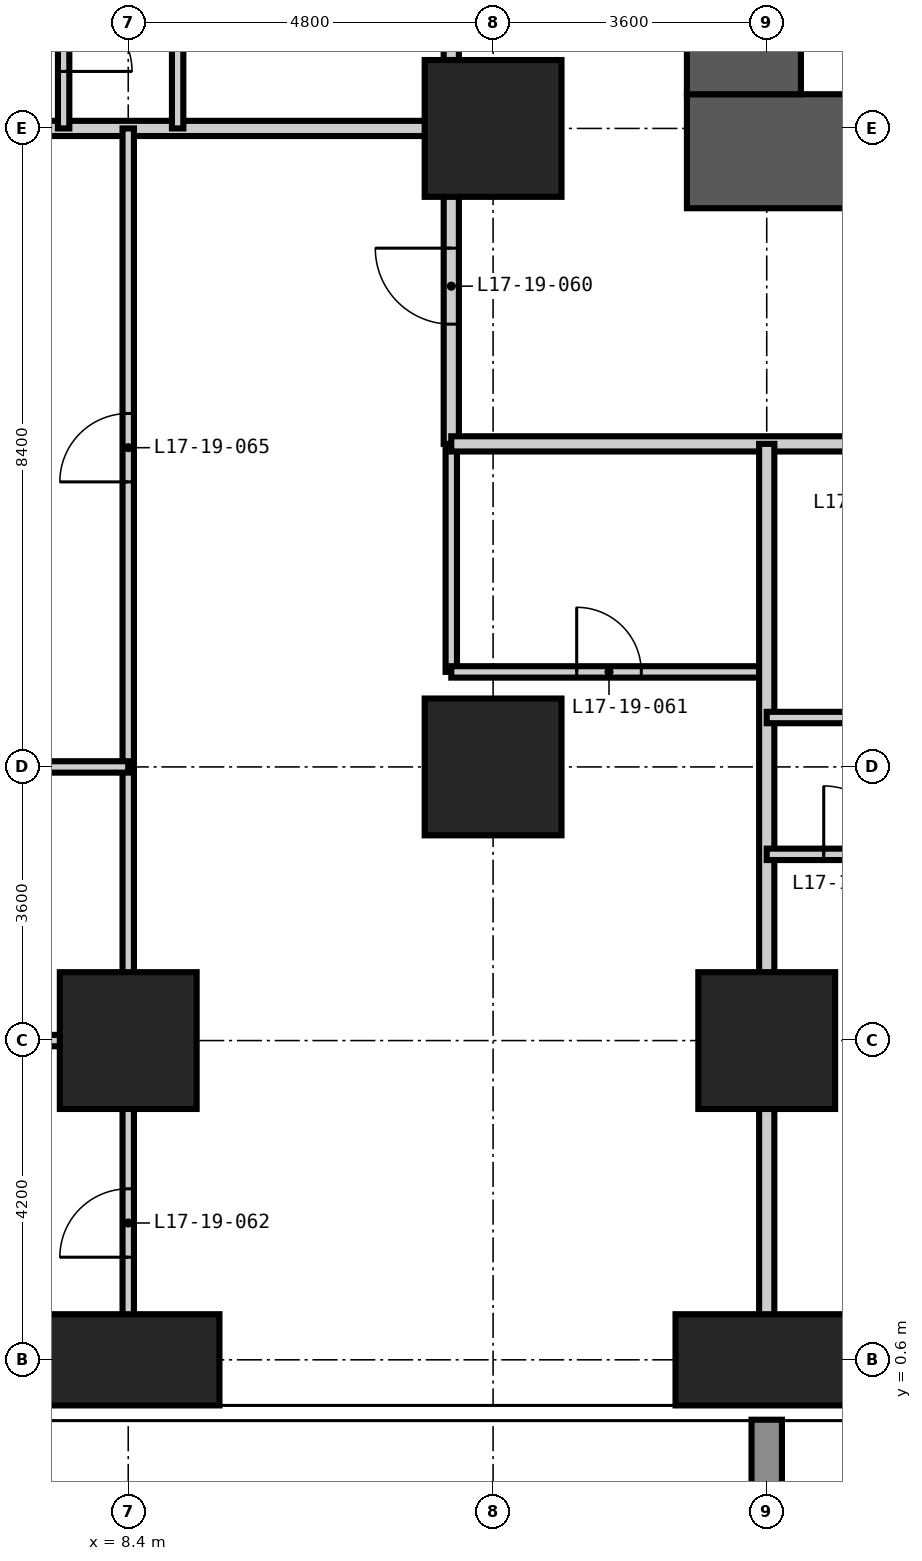
"""IFC4 building model, lengths in metres.
Left out: names, types, materials, properties, quantities, classifications, styles, units other than length and angle.
Written with IfcOpenShell. Run it as: python <this file> out.ifc"""

import sys

from ifc_helpers import new_model, si_unit, direction, frame, frame_2d, origin, origin_2d, place, context, subcontext, project, spatial, rectangle, extrude, element, fill, save


model = new_model("IFC4")
c1 = context("Model", 3, precision=1e-05, world=origin(), true_north=direction((0.0, 1.0)))
c2 = subcontext(c1, "Body", "Model", "MODEL_VIEW")
j1 = project(units=[si_unit("LENGTHUNIT", "METRE"), si_unit("PLANEANGLEUNIT", "RADIAN")], contexts=[c1])
p1 = place(None, origin())
s1 = spatial("IfcSite", under=j1, at=p1, CompositionType="ELEMENT")
p2 = place(p1, origin())
s2 = spatial("IfcBuilding", under=s1, at=p2, CompositionType="ELEMENT")
p3 = place(p2, frame((0.0, 0.0, 70.2)))
s3 = spatial("IfcBuildingStorey", under=s2, at=p3, CompositionType="ELEMENT", Elevation=70.2)
p4 = place(p3, frame((8.4, 0.6, -0.35), z_axis=(0.0, 0.0, 1.0), x_axis=(1.0, 0.0, 0.0)))
e1 = element("IfcColumn", 1, at=p4, inside=s3, PredefinedType="COLUMN", context=c2, shape_type="SweptSolid", body=[
    extrude(rectangle(XDim=2.4, YDim=1.2, at=origin_2d()), origin(), (0.0, 0.0, 1.0), 3.6),
])
for number, where, z_axis, x_axis in (
    (2, (8.4, 4.8, -0.35), (0.0, 0.0, 1.0), (1.0, 0.0, 0.0)),
    (3, (13.2, 8.4, -0.35), (0.0, 0.0, 1.0), (1.0, 0.0, 0.0)),
    (4, (13.2, 16.8, -0.35), (0.0, 0.0, 1.0), (1.0, 0.0, 0.0)),
):
    element("IfcColumn", number, at=place(p3, frame(where, z_axis=z_axis, x_axis=x_axis)), inside=s3, PredefinedType="COLUMN", context=c2, shape_type="SweptSolid", body=[
        extrude(rectangle(XDim=1.8, YDim=1.8, at=origin_2d()), origin(), (0.0, 0.0, 1.0), 3.6),
    ])
p5 = place(p3, frame((16.8, 0.6, -0.35), z_axis=(0.0, 0.0, 1.0), x_axis=(1.0, 0.0, 0.0)))
e5 = element("IfcColumn", 5, at=p5, inside=s3, PredefinedType="COLUMN", context=c2, shape_type="SweptSolid", body=[
    extrude(rectangle(XDim=2.4, YDim=1.2, at=origin_2d()), origin(), (0.0, 0.0, 1.0), 3.6),
])
p6 = place(p3, frame((16.8, 4.8, -0.35), z_axis=(0.0, 0.0, 1.0), x_axis=(1.0, 0.0, 0.0)))
e6 = element("IfcColumn", 6, at=p6, inside=s3, PredefinedType="COLUMN", context=c2, shape_type="SweptSolid", body=[
    extrude(rectangle(XDim=1.8, YDim=1.8, at=origin_2d()), origin(), (0.0, 0.0, 1.0), 3.6),
])
p7 = place(p3, frame((15.75, 16.5, -0.35), z_axis=(0.0, 0.0, 1.0), x_axis=(1.0, 0.0, 0.0)))
e7 = element("IfcWall", 7, at=p7, inside=s3, PredefinedType="SHEAR", context=c2, shape_type="SweptSolid", body=[
    extrude(rectangle(XDim=27.3, YDim=1.5, at=frame_2d((13.65, 0.0))), origin(), (0.0, 0.0, 1.0), 3.6),
])
p8 = place(p7, frame((13.15, 0.0, 0.35)))
e8 = element("IfcOpeningElement", 8, at=p8, cuts=e7, PredefinedType="OPENING", context=c2, shape_type="SweptSolid", body=[
    extrude(rectangle(XDim=1.0, YDim=2.1, at=frame_2d((0.5, 1.05))), frame((0.0, 0.76, 0.0), z_axis=(0.0, -1.0, 0.0), x_axis=(1.0, 0.0, 0.0)), (0.0, 0.0, 1.0), 1.52),
])
p9 = place(p7, frame((19.45, 0.0, 0.35)))
e9 = element("IfcOpeningElement", 9, at=p9, cuts=e7, PredefinedType="OPENING", context=c2, shape_type="SweptSolid", body=[
    extrude(rectangle(XDim=1.0, YDim=2.1, at=frame_2d((0.5, 1.05))), frame((0.0, 0.76, 0.0), z_axis=(0.0, -1.0, 0.0), x_axis=(1.0, 0.0, 0.0)), (0.0, 0.0, 1.0), 1.52),
])
p10 = place(p3, frame((16.5, 41.55, -0.35), z_axis=(0.0, 0.0, 1.0), x_axis=(0.0, -1.0, 0.0)))
e10 = element("IfcWall", 10, at=p10, inside=s3, PredefinedType="SHEAR", context=c2, shape_type="SweptSolid", body=[
    extrude(rectangle(XDim=24.3, YDim=1.5, at=frame_2d((12.15, 0.0))), origin(), (0.0, 0.0, 1.0), 3.6),
])
p11 = place(p10, frame((11.25, 0.0, 0.35)))
e11 = element("IfcOpeningElement", 11, at=p11, cuts=e10, PredefinedType="OPENING", context=c2, shape_type="SweptSolid", body=[
    extrude(rectangle(XDim=1.8, YDim=2.2, at=frame_2d((0.9, 1.1))), frame((0.0, 0.76, 0.0), z_axis=(0.0, -1.0, 0.0), x_axis=(1.0, 0.0, 0.0)), (0.0, 0.0, 1.0), 1.52),
])
p12 = place(p10, frame((20.05, 0.0, 0.35)))
e12 = element("IfcOpeningElement", 12, at=p12, cuts=e10, PredefinedType="OPENING", context=c2, shape_type="SweptSolid", body=[
    extrude(rectangle(XDim=1.0, YDim=2.1, at=frame_2d((0.5, 1.05))), frame((0.0, 0.76, 0.0), z_axis=(0.0, -1.0, 0.0), x_axis=(1.0, 0.0, 0.0)), (0.0, 0.0, 1.0), 1.52),
])
p13 = place(p10, frame((5.35, 0.0, 0.35)))
e13 = element("IfcOpeningElement", 13, at=p13, cuts=e10, PredefinedType="OPENING", context=c2, shape_type="SweptSolid", body=[
    extrude(rectangle(XDim=1.0, YDim=2.1, at=frame_2d((0.5, 1.05))), frame((0.0, 0.76, 0.0), z_axis=(0.0, -1.0, 0.0), x_axis=(1.0, 0.0, 0.0)), (0.0, 0.0, 1.0), 1.52),
])
for number, where, z_axis, x_axis in (
    (14, (12.65, 9.65, 0.0), (0.0, 0.0, 1.0), (0.0, 1.0, 0.0)),
    (15, (5.4, 4.8, 0.0), (0.0, 0.0, 1.0), (1.0, 0.0, 0.0)),
):
    element("IfcWall", number, at=place(p3, frame(where, z_axis=z_axis, x_axis=x_axis)), inside=s3, PredefinedType="PARTITIONING", context=c2, shape_type="SweptSolid", body=[
        extrude(rectangle(XDim=3.0, YDim=0.15, at=frame_2d((1.5, 0.0))), origin(), (0.0, 0.0, 1.0), 3.25),
    ])
p14 = place(p3, frame((12.65, 9.65, 0.0), z_axis=(0.0, 0.0, 1.0), x_axis=(1.0, 0.0, 0.0)))
e16 = element("IfcWall", 16, at=p14, inside=s3, PredefinedType="PARTITIONING", context=c2, shape_type="SweptSolid", body=[
    extrude(rectangle(XDim=4.15, YDim=0.15, at=frame_2d((2.075, 0.0))), origin(), (0.0, 0.0, 1.0), 3.25),
])
p15 = place(p14, frame((1.65, 0.0, 0.0)))
e17 = element("IfcOpeningElement", 17, at=p15, cuts=e16, PredefinedType="OPENING", context=c2, shape_type="SweptSolid", body=[
    extrude(rectangle(XDim=0.85, YDim=2.1, at=frame_2d((0.425, 1.05))), frame((0.0, 0.085, 0.0), z_axis=(0.0, -1.0, 0.0), x_axis=(1.0, 0.0, 0.0)), (0.0, 0.0, 1.0), 0.17),
])
p16 = place(p3, frame((12.65, 12.65, 0.0), z_axis=(0.0, 0.0, 1.0), x_axis=(0.0, 1.0, 0.0)))
e18 = element("IfcWall", 18, at=p16, inside=s3, PredefinedType="PARTITIONING", context=c2, shape_type="SweptSolid", body=[
    extrude(rectangle(XDim=32.9, YDim=0.2, at=frame_2d((16.45, 0.0))), origin(), (0.0, 0.0, 1.0), 3.25),
])
p17 = place(p16, frame((9.05, 0.0, 0.0)))
e19 = element("IfcOpeningElement", 19, at=p17, cuts=e18, PredefinedType="OPENING", context=c2, shape_type="SweptSolid", body=[
    extrude(rectangle(XDim=1.0, YDim=2.2, at=frame_2d((0.5, 1.1))), frame((0.0, 0.11, 0.0), z_axis=(0.0, -1.0, 0.0), x_axis=(1.0, 0.0, 0.0)), (0.0, 0.0, 1.0), 0.22),
])
p18 = place(p16, frame((15.05, 0.0, 0.0)))
e20 = element("IfcOpeningElement", 20, at=p18, cuts=e18, PredefinedType="OPENING", context=c2, shape_type="SweptSolid", body=[
    extrude(rectangle(XDim=1.0, YDim=2.2, at=frame_2d((0.5, 1.1))), frame((0.0, 0.11, 0.0), z_axis=(0.0, -1.0, 0.0), x_axis=(1.0, 0.0, 0.0)), (0.0, 0.0, 1.0), 0.22),
])
p19 = place(p16, frame((25.85, 0.0, 0.0)))
e21 = element("IfcOpeningElement", 21, at=p19, cuts=e18, PredefinedType="OPENING", context=c2, shape_type="SweptSolid", body=[
    extrude(rectangle(XDim=1.0, YDim=2.2, at=frame_2d((0.5, 1.1))), frame((0.0, 0.11, 0.0), z_axis=(0.0, -1.0, 0.0), x_axis=(1.0, 0.0, 0.0)), (0.0, 0.0, 1.0), 0.22),
])
p20 = place(p16, frame((1.575, 0.0, 0.0)))
e22 = element("IfcOpeningElement", 22, at=p20, cuts=e18, PredefinedType="OPENING", context=c2, shape_type="SweptSolid", body=[
    extrude(rectangle(XDim=1.0, YDim=2.2, at=frame_2d((0.5, 1.1))), frame((0.0, 0.11, 0.0), z_axis=(0.0, -1.0, 0.0), x_axis=(1.0, 0.0, 0.0)), (0.0, 0.0, 1.0), 0.22),
])
p21 = place(p16, frame((30.625, 0.0, 0.0)))
e23 = element("IfcOpeningElement", 23, at=p21, cuts=e18, PredefinedType="OPENING", context=c2, shape_type="SweptSolid", body=[
    extrude(rectangle(XDim=1.0, YDim=2.2, at=frame_2d((0.5, 1.1))), frame((0.0, 0.11, 0.0), z_axis=(0.0, -1.0, 0.0), x_axis=(1.0, 0.0, 0.0)), (0.0, 0.0, 1.0), 0.22),
])
p22 = place(p3, frame((44.95, 12.65, 0.0), z_axis=(0.0, 0.0, 1.0), x_axis=(-1.0, 0.0, 0.0)))
e24 = element("IfcWall", 24, at=p22, inside=s3, PredefinedType="PARTITIONING", context=c2, shape_type="SweptSolid", body=[
    extrude(rectangle(XDim=32.3, YDim=0.2, at=frame_2d((16.15, 0.0))), origin(), (0.0, 0.0, 1.0), 3.25),
])
p23 = place(p22, frame((24.35, 0.0, 0.0)))
e25 = element("IfcOpeningElement", 25, at=p23, cuts=e24, PredefinedType="OPENING", context=c2, shape_type="SweptSolid", body=[
    extrude(rectangle(XDim=1.0, YDim=2.2, at=frame_2d((0.5, 1.1))), frame((0.0, 0.11, 0.0), z_axis=(0.0, -1.0, 0.0), x_axis=(1.0, 0.0, 0.0)), (0.0, 0.0, 1.0), 0.22),
])
p24 = place(p22, frame((22.55, 0.0, 0.0)))
e26 = element("IfcOpeningElement", 26, at=p24, cuts=e24, PredefinedType="OPENING", context=c2, shape_type="SweptSolid", body=[
    extrude(rectangle(XDim=1.0, YDim=2.2, at=frame_2d((0.5, 1.1))), frame((0.0, 0.11, 0.0), z_axis=(0.0, -1.0, 0.0), x_axis=(1.0, 0.0, 0.0)), (0.0, 0.0, 1.0), 0.22),
])
p25 = place(p22, frame((15.95, 0.0, 0.0)))
e27 = element("IfcOpeningElement", 27, at=p25, cuts=e24, PredefinedType="OPENING", context=c2, shape_type="SweptSolid", body=[
    extrude(rectangle(XDim=1.0, YDim=2.2, at=frame_2d((0.5, 1.1))), frame((0.0, 0.11, 0.0), z_axis=(0.0, -1.0, 0.0), x_axis=(1.0, 0.0, 0.0)), (0.0, 0.0, 1.0), 0.22),
])
p26 = place(p22, frame((14.15, 0.0, 0.0)))
e28 = element("IfcOpeningElement", 28, at=p26, cuts=e24, PredefinedType="OPENING", context=c2, shape_type="SweptSolid", body=[
    extrude(rectangle(XDim=1.0, YDim=2.2, at=frame_2d((0.5, 1.1))), frame((0.0, 0.11, 0.0), z_axis=(0.0, -1.0, 0.0), x_axis=(1.0, 0.0, 0.0)), (0.0, 0.0, 1.0), 0.22),
])
p27 = place(p22, frame((7.55, 0.0, 0.0)))
e29 = element("IfcOpeningElement", 29, at=p27, cuts=e24, PredefinedType="OPENING", context=c2, shape_type="SweptSolid", body=[
    extrude(rectangle(XDim=1.0, YDim=2.2, at=frame_2d((0.5, 1.1))), frame((0.0, 0.11, 0.0), z_axis=(0.0, -1.0, 0.0), x_axis=(1.0, 0.0, 0.0)), (0.0, 0.0, 1.0), 0.22),
])
p28 = place(p22, frame((5.75, 0.0, 0.0)))
e30 = element("IfcOpeningElement", 30, at=p28, cuts=e24, PredefinedType="OPENING", context=c2, shape_type="SweptSolid", body=[
    extrude(rectangle(XDim=1.0, YDim=2.2, at=frame_2d((0.5, 1.1))), frame((0.0, 0.11, 0.0), z_axis=(0.0, -1.0, 0.0), x_axis=(1.0, 0.0, 0.0)), (0.0, 0.0, 1.0), 0.22),
])
for number, where, z_axis, x_axis in (
    (31, (16.8, -0.008, 0.0), (0.0, 0.0, 1.0), (0.0, 1.0, 0.0)),
    (32, (-0.008, 16.8, 0.0), (0.0, 0.0, 1.0), (1.0, 0.0, 0.0)),
):
    element("IfcWall", number, at=place(p3, frame(where, z_axis=z_axis, x_axis=x_axis)), inside=s3, PredefinedType="PARTITIONING", context=c2, shape_type="SweptSolid", body=[
        extrude(rectangle(XDim=12.658, YDim=0.2, at=frame_2d((6.329, 0.0))), origin(), (0.0, 0.0, 1.0), 3.25),
    ])
p29 = place(p3, frame((7.55, 16.8, 0.0), z_axis=(0.0, 0.0, 1.0), x_axis=(0.0, 1.0, 0.0)))
e33 = element("IfcWall", 33, at=p29, inside=s3, PredefinedType="PARTITIONING", context=c2, shape_type="SweptSolid", body=[
    extrude(rectangle(XDim=2.4, YDim=0.15, at=frame_2d((1.2, 0.0))), origin(), (0.0, 0.0, 1.0), 3.25),
])
p30 = place(p29, frame((0.75, 0.0, 0.0)))
e34 = element("IfcOpeningElement", 34, at=p30, cuts=e33, PredefinedType="OPENING", context=c2, shape_type="SweptSolid", body=[
    extrude(rectangle(XDim=0.9, YDim=2.1, at=frame_2d((0.45, 1.05))), frame((0.0, 0.085, 0.0), z_axis=(0.0, -1.0, 0.0), x_axis=(1.0, 0.0, 0.0)), (0.0, 0.0, 1.0), 0.17),
])
p31 = place(p3, frame((8.4, -0.008, 0.0), z_axis=(0.0, 0.0, 1.0), x_axis=(0.0, 1.0, 0.0)))
e35 = element("IfcWall", 35, at=p31, inside=s3, PredefinedType="PARTITIONING", context=c2, shape_type="SweptSolid", body=[
    extrude(rectangle(XDim=16.808, YDim=0.15, at=frame_2d((8.404, 0.0))), origin(), (0.0, 0.0, 1.0), 3.25),
])
p32 = place(p31, frame((1.958, 0.0, 0.0)))
e36 = element("IfcOpeningElement", 36, at=p32, cuts=e35, PredefinedType="OPENING", context=c2, shape_type="SweptSolid", body=[
    extrude(rectangle(XDim=0.9, YDim=2.1, at=frame_2d((0.45, 1.05))), frame((0.0, 0.085, 0.0), z_axis=(0.0, -1.0, 0.0), x_axis=(1.0, 0.0, 0.0)), (0.0, 0.0, 1.0), 0.17),
])
p33 = place(p31, frame((12.158, 0.0, 0.0)))
e37 = element("IfcOpeningElement", 37, at=p33, cuts=e35, PredefinedType="OPENING", context=c2, shape_type="SweptSolid", body=[
    extrude(rectangle(XDim=0.9, YDim=2.1, at=frame_2d((0.45, 1.05))), frame((0.0, 0.085, 0.0), z_axis=(0.0, -1.0, 0.0), x_axis=(1.0, 0.0, 0.0)), (0.0, 0.0, 1.0), 0.17),
])
p34 = place(p3, frame((9.05, 16.8, 0.0), z_axis=(0.0, 0.0, 1.0), x_axis=(0.0, 1.0, 0.0)))
e38 = element("IfcWall", 38, at=p34, inside=s3, PredefinedType="PARTITIONING", context=c2, shape_type="SweptSolid", body=[
    extrude(rectangle(XDim=2.4, YDim=0.15, at=frame_2d((1.2, 0.0))), origin(), (0.0, 0.0, 1.0), 3.25),
])
p35 = place(p3, frame((16.8, 7.25, 0.0), z_axis=(0.0, 0.0, 1.0), x_axis=(1.0, 0.0, 0.0)))
e39 = element("IfcWall", 39, at=p35, inside=s3, PredefinedType="PARTITIONING", context=c2, shape_type="SweptSolid", body=[
    extrude(rectangle(XDim=2.4, YDim=0.15, at=frame_2d((1.2, 0.0))), origin(), (0.0, 0.0, 1.0), 3.25),
])
p36 = place(p35, frame((0.75, 0.0, 0.0)))
e40 = element("IfcOpeningElement", 40, at=p36, cuts=e39, PredefinedType="OPENING", context=c2, shape_type="SweptSolid", body=[
    extrude(rectangle(XDim=0.9, YDim=2.1, at=frame_2d((0.45, 1.05))), frame((0.0, 0.085, 0.0), z_axis=(0.0, -1.0, 0.0), x_axis=(1.0, 0.0, 0.0)), (0.0, 0.0, 1.0), 0.17),
])
p37 = place(p3, frame((-0.008, 8.4, 0.0), z_axis=(0.0, 0.0, 1.0), x_axis=(1.0, 0.0, 0.0)))
e41 = element("IfcWall", 41, at=p37, inside=s3, PredefinedType="PARTITIONING", context=c2, shape_type="SweptSolid", body=[
    extrude(rectangle(XDim=8.408, YDim=0.15, at=frame_2d((4.204, 0.0))), origin(), (0.0, 0.0, 1.0), 3.25),
])
p38 = place(p37, frame((2.958, 0.0, 0.0)))
e42 = element("IfcOpeningElement", 42, at=p38, cuts=e41, PredefinedType="OPENING", context=c2, shape_type="SweptSolid", body=[
    extrude(rectangle(XDim=0.9, YDim=2.1, at=frame_2d((0.45, 1.05))), frame((0.0, 0.085, 0.0), z_axis=(0.0, -1.0, 0.0), x_axis=(1.0, 0.0, 0.0)), (0.0, 0.0, 1.0), 0.17),
])
p39 = place(p3, frame((16.8, 9.05, 0.0), z_axis=(0.0, 0.0, 1.0), x_axis=(1.0, 0.0, 0.0)))
e43 = element("IfcWall", 43, at=p39, inside=s3, PredefinedType="PARTITIONING", context=c2, shape_type="SweptSolid", body=[
    extrude(rectangle(XDim=2.4, YDim=0.15, at=frame_2d((1.2, 0.0))), origin(), (0.0, 0.0, 1.0), 3.25),
])
p40 = place(p36, origin())
e44 = element("IfcDoor", 44, at=p40, inside=s3, OperationType="SINGLE_SWING_LEFT", PredefinedType="DOOR", context=c2, shape_type="SweptSolid", body=[
    extrude(rectangle(XDim=0.9, YDim=2.1, at=frame_2d((0.45, 1.05))), frame((0.0, 0.025, 0.0), z_axis=(0.0, -1.0, 0.0), x_axis=(1.0, 0.0, 0.0)), (0.0, 0.0, 1.0), 0.05),
])
fill(e40, e44)
p41 = place(p30, frame((0.9, 0.0, 0.0), z_axis=(0.0, 0.0, 1.0), x_axis=(-1.0, 0.0, 0.0)))
e45 = element("IfcDoor", 45, at=p41, inside=s3, OperationType="SINGLE_SWING_RIGHT", PredefinedType="DOOR", context=c2, shape_type="SweptSolid", body=[
    extrude(rectangle(XDim=0.9, YDim=2.1, at=frame_2d((0.45, 1.05))), frame((0.0, 0.025, 0.0), z_axis=(0.0, -1.0, 0.0), x_axis=(1.0, 0.0, 0.0)), (0.0, 0.0, 1.0), 0.05),
])
fill(e34, e45)
p42 = place(p20, origin())
e46 = element("IfcDoor", 46, at=p42, inside=s3, OperationType="SINGLE_SWING_RIGHT", PredefinedType="DOOR", context=c2, shape_type="SweptSolid", body=[
    extrude(rectangle(XDim=1.0, YDim=2.2, at=frame_2d((0.5, 1.1))), frame((0.0, 0.025, 0.0), z_axis=(0.0, -1.0, 0.0), x_axis=(1.0, 0.0, 0.0)), (0.0, 0.0, 1.0), 0.05),
])
fill(e22, e46)
p43 = place(p15, origin())
e47 = element("IfcDoor", 47, at=p43, inside=s3, OperationType="SINGLE_SWING_LEFT", PredefinedType="DOOR", context=c2, shape_type="SweptSolid", body=[
    extrude(rectangle(XDim=0.85, YDim=2.1, at=frame_2d((0.425, 1.05))), frame((0.0, 0.025, 0.0), z_axis=(0.0, -1.0, 0.0), x_axis=(1.0, 0.0, 0.0)), (0.0, 0.0, 1.0), 0.05),
])
fill(e17, e47)
p44 = place(p32, origin())
e48 = element("IfcDoor", 48, at=p44, inside=s3, OperationType="SINGLE_SWING_LEFT", PredefinedType="DOOR", context=c2, shape_type="SweptSolid", body=[
    extrude(rectangle(XDim=0.9, YDim=2.1, at=frame_2d((0.45, 1.05))), frame((0.0, 0.025, 0.0), z_axis=(0.0, -1.0, 0.0), x_axis=(1.0, 0.0, 0.0)), (0.0, 0.0, 1.0), 0.05),
])
fill(e36, e48)
p45 = place(p33, origin())
e49 = element("IfcDoor", 49, at=p45, inside=s3, OperationType="SINGLE_SWING_LEFT", PredefinedType="DOOR", context=c2, shape_type="SweptSolid", body=[
    extrude(rectangle(XDim=0.9, YDim=2.1, at=frame_2d((0.45, 1.05))), frame((0.0, 0.025, 0.0), z_axis=(0.0, -1.0, 0.0), x_axis=(1.0, 0.0, 0.0)), (0.0, 0.0, 1.0), 0.05),
])
fill(e37, e49)
save(model, sys.argv[1])
